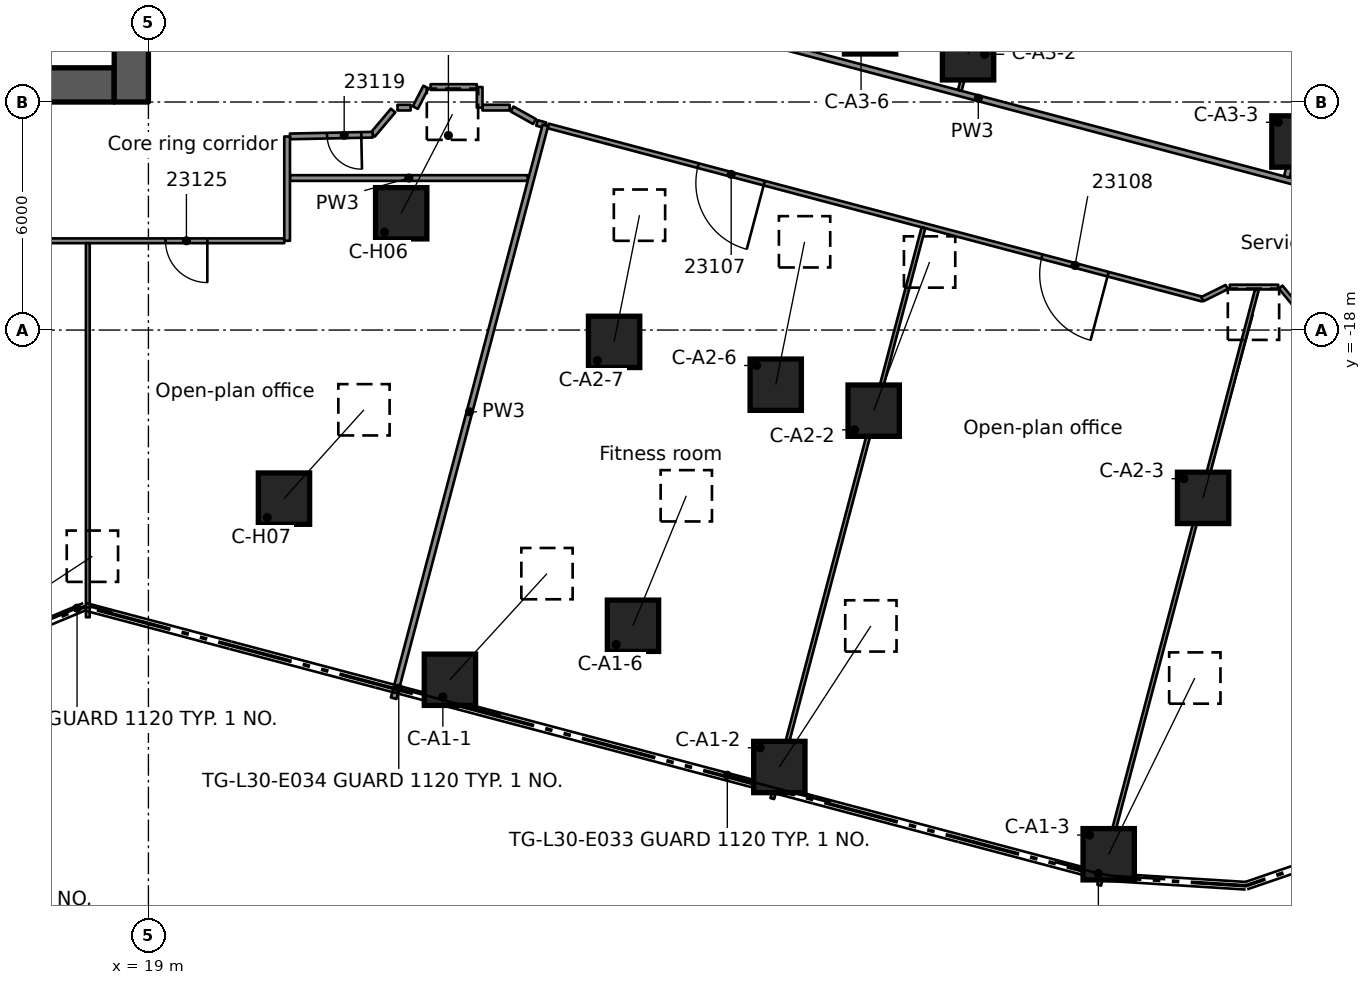
"""IFC4 building model, lengths in metres.
Left out: names, types, materials, properties, quantities, classifications, styles, units other than length and angle.
Written with IfcOpenShell. Run it as: python <this file> out.ifc"""

import sys

from ifc_helpers import new_model, si_unit, direction, frame, frame_2d, origin, origin_2d, place, context, subcontext, project, spatial, rectangle, extrude, element, fill, save


model = new_model("IFC4")
c1 = context("Model", 3, precision=1e-05, world=origin(), true_north=direction((0.0, 1.0)))
c2 = subcontext(c1, "Body", "Model", "MODEL_VIEW")
j1 = project(units=[si_unit("LENGTHUNIT", "METRE"), si_unit("PLANEANGLEUNIT", "RADIAN")], contexts=[c1])
p1 = place(None, origin())
s1 = spatial("IfcSite", under=j1, at=p1, CompositionType="ELEMENT")
p2 = place(p1, origin())
s2 = spatial("IfcBuilding", under=s1, at=p2, CompositionType="ELEMENT")
p3 = place(p2, frame((0.0, 0.0, 119.7)))
s3 = spatial("IfcBuildingStorey", under=s2, at=p3, CompositionType="ELEMENT", Elevation=119.7)
p4 = place(p3, frame((8.9, -11.55, 0.0), z_axis=(0.0, 0.0, 1.0), x_axis=(1.0, 0.0, 0.0)))
e1 = element("IfcWall", 1, at=p4, inside=s3, PredefinedType="SHEAR", context=c2, shape_type="SweptSolid", body=[
    extrude(rectangle(XDim=9.2, YDim=0.9, at=frame_2d((4.6, 0.0))), origin(), (0.0, 0.0, 1.0), 4.0),
])
p5 = place(p4, frame((3.0, 0.0, 0.0)))
e2 = element("IfcOpeningElement", 2, at=p5, cuts=e1, PredefinedType="OPENING", context=c2, shape_type="SweptSolid", body=[
    extrude(rectangle(XDim=1.1, YDim=2.1, at=frame_2d((0.55, 1.05))), frame((0.0, 0.46, 0.0), z_axis=(0.0, -1.0, 0.0), x_axis=(1.0, 0.0, 0.0)), (0.0, 0.0, 1.0), 0.92),
])
p6 = place(p3, frame((18.55, -12.0, 0.0), z_axis=(0.0, 0.0, 1.0), x_axis=(0.0, 1.0, 0.0)))
e3 = element("IfcWall", 3, at=p6, inside=s3, PredefinedType="SHEAR", context=c2, shape_type="SweptSolid", body=[
    extrude(rectangle(XDim=24.0, YDim=0.9, at=frame_2d((12.0, 0.0))), origin(), (0.0, 0.0, 1.0), 4.0),
])
p7 = place(p6, frame((12.1, 0.0, 0.0)))
e4 = element("IfcOpeningElement", 4, at=p7, cuts=e3, PredefinedType="OPENING", context=c2, shape_type="SweptSolid", body=[
    extrude(rectangle(XDim=1.8, YDim=2.1, at=frame_2d((0.9, 1.05))), frame((0.0, 0.46, 0.0), z_axis=(0.0, -1.0, 0.0), x_axis=(1.0, 0.0, 0.0)), (0.0, 0.0, 1.0), 0.92),
])
p8 = place(p3, frame((26.934, -27.202, 0.533), z_axis=(0.533389756548, 0.583307409895, 0.61257475721), x_axis=(-0.737978327444, 0.674824412884, 0.0)))
e5 = element("IfcColumn", 5, at=p8, inside=s3, PredefinedType="COLUMN", context=c2, shape_type="SweptSolid", body=[
    extrude(rectangle(XDim=1.35, YDim=1.35, at=origin_2d()), origin(), (0.0, 0.0, 1.0), 4.788),
])
p9 = place(p3, frame((35.602, -29.497, 0.567), z_axis=(0.456860510692, 0.704019870789, 0.543722811094), x_axis=(-0.838853030325, 0.5443579645, 0.0)))
e6 = element("IfcColumn", 6, at=p9, inside=s3, PredefinedType="COLUMN", context=c2, shape_type="SweptSolid", body=[
    extrude(rectangle(XDim=1.35, YDim=1.35, at=origin_2d()), origin(), (0.0, 0.0, 1.0), 5.273),
])
p10 = place(p3, frame((44.269, -31.793, 0.593), z_axis=(0.385435051293, 0.788769306025, 0.47883483907), x_axis=(-0.898467718032, 0.439039587798, 0.0)))
e7 = element("IfcColumn", 7, at=p10, inside=s3, PredefinedType="COLUMN", context=c2, shape_type="SweptSolid", body=[
    extrude(rectangle(XDim=1.35, YDim=1.35, at=origin_2d()), origin(), (0.0, 0.0, 1.0), 5.879),
])
p11 = place(p3, frame((31.751, -25.781, 0.528), z_axis=(0.296903854869, 0.723687001742, 0.622996969875), x_axis=(-0.925165644997, 0.379563603783, 0.0)))
e8 = element("IfcColumn", 8, at=p11, inside=s3, PredefinedType="COLUMN", context=c2, shape_type="SweptSolid", body=[
    extrude(rectangle(XDim=1.35, YDim=1.35, at=origin_2d()), origin(), (0.0, 0.0, 1.0), 4.726),
])
p12 = place(p3, frame((38.085, -20.121, 0.555), z_axis=(0.289489509288, 0.769921974579, 0.568696735591), x_axis=(-0.936021546836, 0.351942699681, 0.0)))
e9 = element("IfcColumn", 9, at=p12, inside=s3, PredefinedType="COLUMN", context=c2, shape_type="SweptSolid", body=[
    extrude(rectangle(XDim=1.35, YDim=1.35, at=origin_2d()), origin(), (0.0, 0.0, 1.0), 5.081),
])
p13 = place(p3, frame((46.753, -22.416, 0.588), z_axis=(0.230570287465, 0.840104405285, 0.490980580837), x_axis=(-0.964339803907, 0.264667229933, 0.0)))
e10 = element("IfcColumn", 10, at=p13, inside=s3, PredefinedType="COLUMN", context=c2, shape_type="SweptSolid", body=[
    extrude(rectangle(XDim=1.35, YDim=1.35, at=origin_2d()), origin(), (0.0, 0.0, 1.0), 5.752),
])
p14 = place(p3, frame((35.507, -19.438, 0.537), z_axis=(0.157315651757, 0.779291847126, 0.606593770752), x_axis=(-0.98022658552, 0.197878349093, 0.0)))
e11 = element("IfcColumn", 11, at=p14, inside=s3, PredefinedType="COLUMN", context=c2, shape_type="SweptSolid", body=[
    extrude(rectangle(XDim=1.35, YDim=1.35, at=origin_2d()), origin(), (0.0, 0.0, 1.0), 4.825),
])
p15 = place(p3, frame((31.254, -18.311, 0.507), z_axis=(0.147670935204, 0.73679002234, 0.659798270592), x_axis=(-0.980500509342, 0.196516541745, 0.0)))
e12 = element("IfcColumn", 12, at=p15, inside=s3, PredefinedType="COLUMN", context=c2, shape_type="SweptSolid", body=[
    extrude(rectangle(XDim=1.35, YDim=1.35, at=origin_2d()), origin(), (0.0, 0.0, 1.0), 4.525),
])
p16 = place(p3, frame((40.568, -10.744, 0.554), z_axis=(0.105609699253, 0.813296092737, 0.572185334452), x_axis=(-0.991674124322, 0.128772788855, 0.0)))
e13 = element("IfcColumn", 13, at=p16, inside=s3, PredefinedType="COLUMN", context=c2, shape_type="SweptSolid", body=[
    extrude(rectangle(XDim=1.35, YDim=1.35, at=origin_2d()), origin(), (0.0, 0.0, 1.0), 5.056),
])
p17 = place(p3, frame((49.236, -13.039, 0.589), z_axis=(0.067270096291, 0.870203938653, 0.488077698013), x_axis=(-0.997025384371, 0.077073879619, 0.0)))
e14 = element("IfcColumn", 14, at=p17, inside=s3, PredefinedType="COLUMN", context=c2, shape_type="SweptSolid", body=[
    extrude(rectangle(XDim=1.35, YDim=1.35, at=origin_2d()), origin(), (0.0, 0.0, 1.0), 5.781),
])
p18 = place(p3, frame((25.652, -14.927, 0.467), z_axis=(0.317802494758, 0.613977163628, 0.722518938761), x_axis=(-0.888082969934, 0.459683193638, 0.0)))
e15 = element("IfcColumn", 15, at=p18, inside=s3, PredefinedType="COLUMN", context=c2, shape_type="SweptSolid", body=[
    extrude(rectangle(XDim=1.35, YDim=1.35, at=origin_2d()), origin(), (0.0, 0.0, 1.0), 4.244),
])
p19 = place(p3, frame((22.567, -22.436, 0.486), z_axis=(0.48216463464, 0.535508605584, 0.693359790043), x_axis=(-0.743151367049, 0.669123341136, 0.0)))
e16 = element("IfcColumn", 16, at=p19, inside=s3, PredefinedType="COLUMN", context=c2, shape_type="SweptSolid", body=[
    extrude(rectangle(XDim=1.35, YDim=1.35, at=origin_2d()), origin(), (0.0, 0.0, 1.0), 4.366),
])
p20 = place(p3, frame((15.076, -25.565, 0.467), z_axis=(0.57724832469, 0.380287859943, 0.722610209742), x_axis=(-0.550140625577, 0.835072028085, 0.0)))
e17 = element("IfcColumn", 17, at=p20, inside=s3, PredefinedType="COLUMN", context=c2, shape_type="SweptSolid", body=[
    extrude(rectangle(XDim=1.35, YDim=1.35, at=origin_2d()), origin(), (0.0, 0.0, 1.0), 4.244),
])
p21 = place(p3, frame((25.439, -12.224, 0.0), z_axis=(0.0, 0.0, 1.0), x_axis=(-0.645047626859, -0.764142368334, 0.0)))
e18 = element("IfcWall", 18, at=p21, inside=s3, PredefinedType="PARTITIONING", context=c2, shape_type="SweptSolid", body=[
    extrude(rectangle(XDim=0.832, YDim=0.15, at=frame_2d((0.416, 0.0))), origin(), (0.0, 0.0, 1.0), 3.58),
])
p22 = place(p3, frame((28.57, -12.184, 0.0), z_axis=(0.0, 0.0, 1.0), x_axis=(0.872807707382, -0.488064243656, 0.0)))
e19 = element("IfcWall", 19, at=p22, inside=s3, PredefinedType="PARTITIONING", context=c2, shape_type="SweptSolid", body=[
    extrude(rectangle(XDim=0.676, YDim=0.15, at=frame_2d((0.338, 0.0))), origin(), (0.0, 0.0, 1.0), 3.58),
])
p23 = place(p3, frame((29.225, -12.551, 0.0), z_axis=(0.0, 0.0, 1.0), x_axis=(0.966057538247, -0.258326988128, 0.0)))
e20 = element("IfcWall", 20, at=p23, inside=s3, PredefinedType="PARTITIONING", context=c2, shape_type="SweptSolid", body=[
    extrude(rectangle(XDim=0.229, YDim=0.15, at=frame_2d((0.114, 0.0))), origin(), (0.0, 0.0, 1.0), 3.58),
])
p24 = place(p3, frame((46.733, -17.187, 0.0), z_axis=(0.0, 0.0, 1.0), x_axis=(-0.966684476385, 0.255970941937, 0.0)))
e21 = element("IfcWall", 21, at=p24, inside=s3, PredefinedType="PARTITIONING", context=c2, shape_type="SweptSolid", body=[
    extrude(rectangle(XDim=17.807, YDim=0.125, at=frame_2d((8.904, 0.0))), origin(), (0.0, 0.0, 1.0), 3.58),
])
p25 = place(p24, frame((11.925, 0.0, 0.0)))
e22 = element("IfcOpeningElement", 22, at=p25, cuts=e21, PredefinedType="OPENING", context=c2, shape_type="SweptSolid", body=[
    extrude(rectangle(XDim=1.8, YDim=2.1, at=frame_2d((0.9, 1.05))), frame((0.0, 0.073, 0.0), z_axis=(0.0, -1.0, 0.0), x_axis=(1.0, 0.0, 0.0)), (0.0, 0.0, 1.0), 0.145),
])
p26 = place(p24, frame((2.566, 0.0, 0.0)))
e23 = element("IfcOpeningElement", 23, at=p26, cuts=e21, PredefinedType="OPENING", context=c2, shape_type="SweptSolid", body=[
    extrude(rectangle(XDim=1.8, YDim=2.1, at=frame_2d((0.9, 1.05))), frame((0.0, 0.073, 0.0), z_axis=(0.0, -1.0, 0.0), x_axis=(1.0, 0.0, 0.0)), (0.0, 0.0, 1.0), 0.145),
])
p27 = place(p3, frame((30.589, -9.187, 0.0), z_axis=(0.0, 0.0, 1.0), x_axis=(0.966677828303, -0.255996047367, 0.0)))
e24 = element("IfcWall", 24, at=p27, inside=s3, PredefinedType="PARTITIONING", context=c2, shape_type="SweptSolid", body=[
    extrude(rectangle(XDim=21.203, YDim=0.15, at=frame_2d((10.602, 0.0))), origin(), (0.0, 0.0, 1.0), 3.58),
])
p28 = place(p27, frame((4.6, 0.0, 0.0)))
e25 = element("IfcOpeningElement", 25, at=p28, cuts=e24, PredefinedType="OPENING", context=c2, shape_type="SweptSolid", body=[
    extrude(rectangle(XDim=0.9, YDim=2.1, at=frame_2d((0.45, 1.05))), frame((0.0, 0.085, 0.0), z_axis=(0.0, -1.0, 0.0), x_axis=(1.0, 0.0, 0.0)), (0.0, 0.0, 1.0), 0.17),
])
p29 = place(p3, frame((47.456, -16.869, 0.0), z_axis=(0.0, 0.0, 1.0), x_axis=(1.0, 0.0, 0.0)))
e26 = element("IfcWall", 26, at=p29, inside=s3, PredefinedType="PARTITIONING", context=c2, shape_type="SweptSolid", body=[
    extrude(rectangle(XDim=1.274, YDim=0.125, at=frame_2d((0.637, 0.0))), origin(), (0.0, 0.0, 1.0), 3.58),
])
p30 = place(p3, frame((22.575, -15.651, 0.0), z_axis=(0.0, 0.0, 1.0), x_axis=(-1.0, 0.0, 0.0)))
e27 = element("IfcWall", 27, at=p30, inside=s3, PredefinedType="PARTITIONING", context=c2, shape_type="SweptSolid", body=[
    extrude(rectangle(XDim=10.415, YDim=0.125, at=frame_2d((5.208, 0.0))), origin(), (0.0, 0.0, 1.0), 3.58),
])
p31 = place(p30, frame((2.025, 0.0, 0.0)))
e28 = element("IfcOpeningElement", 28, at=p31, cuts=e27, PredefinedType="OPENING", context=c2, shape_type="SweptSolid", body=[
    extrude(rectangle(XDim=1.1, YDim=2.1, at=frame_2d((0.55, 1.05))), frame((0.0, 0.073, 0.0), z_axis=(0.0, -1.0, 0.0), x_axis=(1.0, 0.0, 0.0)), (0.0, 0.0, 1.0), 0.145),
])
p32 = place(p3, frame((22.725, -14.0, 0.0), z_axis=(0.0, 0.0, 1.0), x_axis=(1.0, 0.0, 0.0)))
e29 = element("IfcWall", 29, at=p32, inside=s3, PredefinedType="PARTITIONING", context=c2, shape_type="SweptSolid", body=[
    extrude(rectangle(XDim=6.256, YDim=0.15, at=frame_2d((3.128, 0.0))), origin(), (0.0, 0.0, 1.0), 3.58),
])
p33 = place(p3, frame((25.554, -12.147, 0.0), z_axis=(0.0, 0.0, 1.0), x_axis=(1.0, 0.0, 0.0)))
e30 = element("IfcWall", 30, at=p33, inside=s3, PredefinedType="PARTITIONING", context=c2, shape_type="SweptSolid", body=[
    extrude(rectangle(XDim=0.345, YDim=0.15, at=frame_2d((0.172, 0.0))), origin(), (0.0, 0.0, 1.0), 3.58),
])
p34 = place(p3, frame((27.791, -12.147, 0.0), z_axis=(0.0, 0.0, 1.0), x_axis=(1.0, 0.0, 0.0)))
e31 = element("IfcWall", 31, at=p34, inside=s3, PredefinedType="PARTITIONING", context=c2, shape_type="SweptSolid", body=[
    extrude(rectangle(XDim=0.714, YDim=0.15, at=frame_2d((0.357, 0.0))), origin(), (0.0, 0.0, 1.0), 3.58),
])
p35 = place(p3, frame((26.425, -11.606, 0.0), z_axis=(0.0, 0.0, 1.0), x_axis=(1.0, 0.0, 0.0)))
e32 = element("IfcWall", 32, at=p35, inside=s3, PredefinedType="PARTITIONING", context=c2, shape_type="SweptSolid", body=[
    extrude(rectangle(XDim=1.216, YDim=0.15, at=frame_2d((0.608, 0.0))), origin(), (0.0, 0.0, 1.0), 3.58),
])
p36 = place(p3, frame((24.902, -12.86, 0.0), z_axis=(0.0, 0.0, 1.0), x_axis=(-0.999787171662, -0.020630350968, 0.0)))
e33 = element("IfcWall", 33, at=p36, inside=s3, PredefinedType="PARTITIONING", context=c2, shape_type="SweptSolid", body=[
    extrude(rectangle(XDim=2.177, YDim=0.15, at=frame_2d((1.089, 0.0))), origin(), (0.0, 0.0, 1.0), 3.58),
])
p37 = place(p36, frame((0.301, 0.0, 0.0)))
e34 = element("IfcOpeningElement", 34, at=p37, cuts=e33, PredefinedType="OPENING", context=c2, shape_type="SweptSolid", body=[
    extrude(rectangle(XDim=0.9, YDim=2.1, at=frame_2d((0.45, 1.05))), frame((0.0, 0.085, 0.0), z_axis=(0.0, -1.0, 0.0), x_axis=(1.0, 0.0, 0.0)), (0.0, 0.0, 1.0), 0.17),
])
p38 = place(p3, frame((26.023, -12.146, 0.0), z_axis=(0.0, 0.0, 1.0), x_axis=(0.459062318859, 0.888404067643, 0.0)))
e35 = element("IfcWall", 35, at=p38, inside=s3, PredefinedType="PARTITIONING", context=c2, shape_type="SweptSolid", body=[
    extrude(rectangle(XDim=0.608, YDim=0.15, at=frame_2d((0.304, 0.0))), origin(), (0.0, 0.0, 1.0), 3.58),
])
p39 = place(p3, frame((46.733, -17.187, 0.0), z_axis=(0.0, 0.0, 1.0), x_axis=(0.895787517552, 0.444482534413, 0.0)))
e36 = element("IfcWall", 36, at=p39, inside=s3, PredefinedType="PARTITIONING", context=c2, shape_type="SweptSolid", body=[
    extrude(rectangle(XDim=0.716, YDim=0.125, at=frame_2d((0.358, 0.0))), origin(), (0.0, 0.0, 1.0), 3.58),
])
p40 = place(p3, frame((44.019, -32.606, 0.0), z_axis=(0.0, 0.0, 1.0), x_axis=(0.256017225192, 0.966672219734, 0.0)))
e37 = element("IfcWall", 37, at=p40, inside=s3, PredefinedType="PARTITIONING", context=c2, shape_type="SweptSolid", body=[
    extrude(rectangle(XDim=16.202, YDim=0.1, at=frame_2d((8.101, 0.0))), origin(), (0.0, 0.0, 1.0), 3.58),
])
p41 = place(p3, frame((48.954, -13.972, 0.0), z_axis=(0.0, 0.0, 1.0), x_axis=(0.255954468908, 0.966688838172, 0.0)))
e38 = element("IfcWall", 38, at=p41, inside=s3, PredefinedType="PARTITIONING", context=c2, shape_type="SweptSolid", body=[
    extrude(rectangle(XDim=5.961, YDim=0.15, at=frame_2d((2.981, 0.0))), origin(), (0.0, 0.0, 1.0), 3.58),
])
p42 = place(p3, frame((35.417, -30.328, 0.0), z_axis=(0.0, 0.0, 1.0), x_axis=(0.255966412414, 0.966685675758, 0.0)))
e39 = element("IfcWall", 39, at=p42, inside=s3, PredefinedType="PARTITIONING", context=c2, shape_type="SweptSolid", body=[
    extrude(rectangle(XDim=15.537, YDim=0.1, at=frame_2d((7.769, 0.0))), origin(), (0.0, 0.0, 1.0), 3.58),
])
p43 = place(p3, frame((40.351, -11.694, 0.0), z_axis=(0.0, 0.0, 1.0), x_axis=(0.255944336433, 0.966691520935, 0.0)))
e40 = element("IfcWall", 40, at=p43, inside=s3, PredefinedType="PARTITIONING", context=c2, shape_type="SweptSolid", body=[
    extrude(rectangle(XDim=5.962, YDim=0.1, at=frame_2d((2.981, 0.0))), origin(), (0.0, 0.0, 1.0), 3.58),
])
p44 = place(p3, frame((25.453, -27.689, 0.0), z_axis=(0.0, 0.0, 1.0), x_axis=(0.256041000642, 0.966665922638, 0.0)))
e41 = element("IfcWall", 41, at=p44, inside=s3, PredefinedType="PARTITIONING", context=c2, shape_type="SweptSolid", body=[
    extrude(rectangle(XDim=15.596, YDim=0.15, at=frame_2d((7.798, 0.0))), origin(), (0.0, 0.0, 1.0), 3.58),
])
p45 = place(p3, frame((49.708, -17.975, 0.0), z_axis=(0.0, 0.0, 1.0), x_axis=(-0.637386714636, 0.770544077912, 0.0)))
e42 = element("IfcWall", 42, at=p45, inside=s3, PredefinedType="PARTITIONING", context=c2, shape_type="SweptSolid", body=[
    extrude(rectangle(XDim=1.436, YDim=0.125, at=frame_2d((0.718, 0.0))), origin(), (0.0, 0.0, 1.0), 3.58),
])
p46 = place(p3, frame((27.716, -12.147, 0.0), z_axis=(0.0, 0.0, 1.0), x_axis=(0.0, 1.0, 0.0)))
e43 = element("IfcWall", 43, at=p46, inside=s3, PredefinedType="PARTITIONING", context=c2, shape_type="SweptSolid", body=[
    extrude(rectangle(XDim=0.541, YDim=0.15, at=frame_2d((0.271, 0.0))), origin(), (0.0, 0.0, 1.0), 3.58),
])
p47 = place(p3, frame((22.65, -15.651, 0.0), z_axis=(0.0, 0.0, 1.0), x_axis=(0.0, 1.0, 0.0)))
e44 = element("IfcWall", 44, at=p47, inside=s3, PredefinedType="PARTITIONING", context=c2, shape_type="SweptSolid", body=[
    extrude(rectangle(XDim=2.744, YDim=0.15, at=frame_2d((1.372, 0.0))), origin(), (0.0, 0.0, 1.0), 3.58),
])
p48 = place(p3, frame((17.405, -25.557, 0.0), z_axis=(0.0, 0.0, 1.0), x_axis=(0.0, 1.0, 0.0)))
e45 = element("IfcWall", 45, at=p48, inside=s3, PredefinedType="PARTITIONING", context=c2, shape_type="SweptSolid", body=[
    extrude(rectangle(XDim=9.844, YDim=0.1, at=frame_2d((4.922, 0.0))), origin(), (0.0, 0.0, 1.0), 3.58),
])
p49 = place(p25, origin())
e46 = element("IfcDoor", 46, at=p49, inside=s3, OperationType="DOUBLE_DOOR_SINGLE_SWING", PredefinedType="DOOR", context=c2, shape_type="SweptSolid", body=[
    extrude(rectangle(XDim=1.8, YDim=2.1, at=frame_2d((0.9, 1.05))), frame((0.0, 0.025, 0.0), z_axis=(0.0, -1.0, 0.0), x_axis=(1.0, 0.0, 0.0)), (0.0, 0.0, 1.0), 0.05),
])
fill(e22, e46)
p50 = place(p26, origin())
e47 = element("IfcDoor", 47, at=p50, inside=s3, OperationType="DOUBLE_DOOR_SINGLE_SWING", PredefinedType="DOOR", context=c2, shape_type="SweptSolid", body=[
    extrude(rectangle(XDim=1.8, YDim=2.1, at=frame_2d((0.9, 1.05))), frame((0.0, 0.025, 0.0), z_axis=(0.0, -1.0, 0.0), x_axis=(1.0, 0.0, 0.0)), (0.0, 0.0, 1.0), 0.05),
])
fill(e23, e47)
p51 = place(p37, origin())
e48 = element("IfcDoor", 48, at=p51, inside=s3, OperationType="SINGLE_SWING_LEFT", PredefinedType="DOOR", context=c2, shape_type="SweptSolid", body=[
    extrude(rectangle(XDim=0.9, YDim=2.1, at=frame_2d((0.45, 1.05))), frame((0.0, 0.025, 0.0), z_axis=(0.0, -1.0, 0.0), x_axis=(1.0, 0.0, 0.0)), (0.0, 0.0, 1.0), 0.05),
])
fill(e34, e48)
p52 = place(p31, origin())
e49 = element("IfcDoor", 49, at=p52, inside=s3, OperationType="SINGLE_SWING_LEFT", PredefinedType="DOOR", context=c2, shape_type="SweptSolid", body=[
    extrude(rectangle(XDim=1.1, YDim=2.1, at=frame_2d((0.55, 1.05))), frame((0.0, 0.025, 0.0), z_axis=(0.0, -1.0, 0.0), x_axis=(1.0, 0.0, 0.0)), (0.0, 0.0, 1.0), 0.05),
])
fill(e28, e49)
save(model, sys.argv[1])
